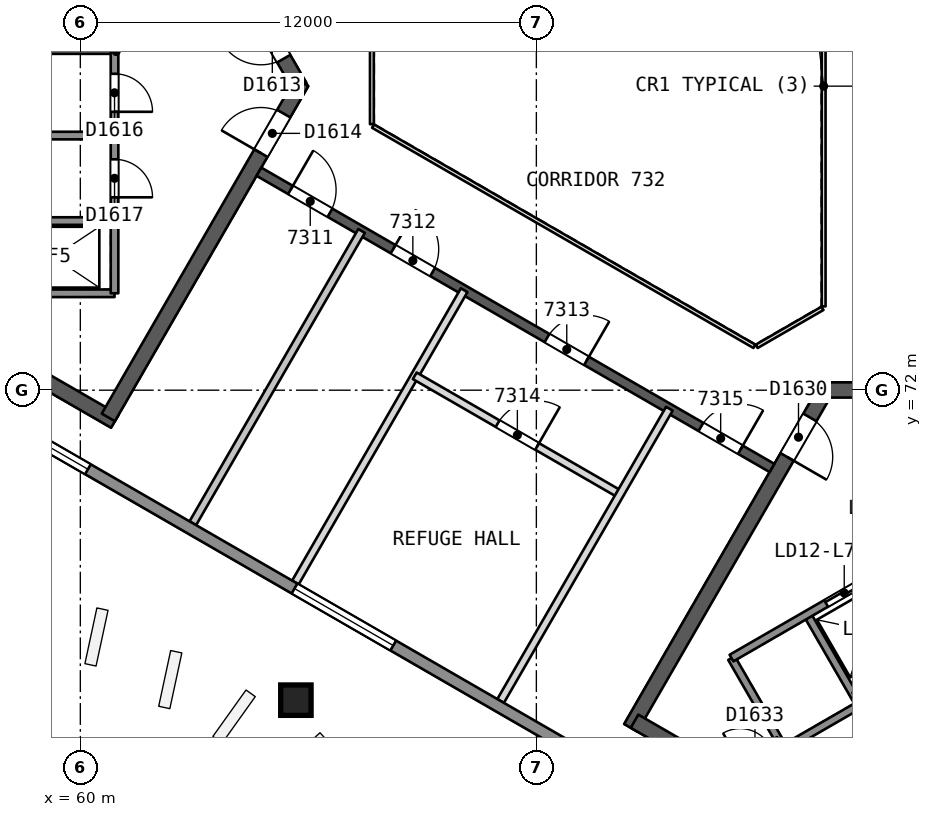
"""IFC4 building model, lengths in metres.
Left out: names, types, materials, properties, quantities, classifications, styles, units other than length and angle.
Written with IfcOpenShell. Run it as: python <this file> out.ifc"""

import sys

from ifc_helpers import new_model, si_unit, direction, frame, frame_2d, origin, origin_2d, place, context, subcontext, project, spatial, rectangle, extrude, element, fill, save


model = new_model("IFC4")
c1 = context("Model", 3, precision=1e-05, world=origin(), true_north=direction((0.0, 1.0)))
c2 = subcontext(c1, "Body", "Model", "MODEL_VIEW")
j1 = project(units=[si_unit("LENGTHUNIT", "METRE"), si_unit("PLANEANGLEUNIT", "RADIAN")], contexts=[c1])
p1 = place(None, origin())
s1 = spatial("IfcSite", under=j1, at=p1, CompositionType="ELEMENT")
p2 = place(p1, origin())
s2 = spatial("IfcBuilding", under=s1, at=p2, CompositionType="ELEMENT")
p3 = place(p2, frame((0.0, 0.0, 296.0)))
s3 = spatial("IfcBuildingStorey", under=s2, at=p3, CompositionType="ELEMENT", Elevation=296.0)
p4 = place(p3, frame((65.769, 80.0, 0.0), z_axis=(0.0, 0.0, 1.0), x_axis=(-0.50000177223, 0.866024380585, 0.0)))
e1 = element("IfcWall", 1, at=p4, inside=s3, PredefinedType="SHEAR", context=c2, shape_type="SweptSolid", body=[
    extrude(rectangle(XDim=10.265, YDim=0.4, at=frame_2d((5.132, 0.0))), origin(), (0.0, 0.0, 1.0), 4.4),
])
p5 = place(p4, frame((0.834, 0.0, 0.0)))
e2 = element("IfcOpeningElement", 2, at=p5, cuts=e1, PredefinedType="OPENING", context=c2, shape_type="SweptSolid", body=[
    extrude(rectangle(XDim=1.2, YDim=2.1, at=frame_2d((0.6, 1.05))), frame((0.0, 0.21, 0.0), z_axis=(0.0, -1.0, 0.0), x_axis=(1.0, 0.0, 0.0)), (0.0, 0.0, 1.0), 0.421),
])
p6 = place(p3, frame((48.597, 78.293, 0.0), z_axis=(0.0, 0.0, 1.0), x_axis=(0.866026024469, -0.499998924941, 0.0)))
e3 = element("IfcWall", 3, at=p6, inside=s3, PredefinedType="SHEAR", context=c2, shape_type="SweptSolid", body=[
    extrude(rectangle(XDim=14.218, YDim=0.4, at=frame_2d((7.109, 0.0))), origin(), (0.0, 0.0, 1.0), 4.4),
])
p7 = place(p3, frame((60.737, 71.284, 0.0), z_axis=(0.0, 0.0, 1.0), x_axis=(0.50000547566, 0.866022242388, 0.0)))
e4 = element("IfcWall", 4, at=p7, inside=s3, PredefinedType="SHEAR", context=c2, shape_type="SweptSolid", body=[
    extrude(rectangle(XDim=10.18, YDim=0.4, at=frame_2d((5.09, 0.0))), origin(), (0.0, 0.0, 1.0), 4.4),
])
p8 = place(p7, frame((8.03, 0.0, 0.0)))
e5 = element("IfcOpeningElement", 5, at=p8, cuts=e4, PredefinedType="OPENING", context=c2, shape_type="SweptSolid", body=[
    extrude(rectangle(XDim=1.2, YDim=2.1, at=frame_2d((0.6, 1.05))), frame((0.0, 0.21, 0.0), z_axis=(0.0, -1.0, 0.0), x_axis=(1.0, 0.0, 0.0)), (0.0, 0.0, 1.0), 0.421),
])
p9 = place(p3, frame((79.615, 72.006, 0.0), z_axis=(0.0, 0.0, 1.0), x_axis=(-0.50000177223, -0.866024380585, 0.0)))
e6 = element("IfcWall", 6, at=p9, inside=s3, PredefinedType="SHEAR", context=c2, shape_type="SweptSolid", body=[
    extrude(rectangle(XDim=10.265, YDim=0.4, at=frame_2d((5.132, 0.0))), origin(), (0.0, 0.0, 1.0), 4.4),
])
p10 = place(p9, frame((0.834, 0.0, 0.0)))
e7 = element("IfcOpeningElement", 7, at=p10, cuts=e6, PredefinedType="OPENING", context=c2, shape_type="SweptSolid", body=[
    extrude(rectangle(XDim=1.2, YDim=2.1, at=frame_2d((0.6, 1.05))), frame((0.0, 0.21, 0.0), z_axis=(0.0, -1.0, 0.0), x_axis=(1.0, 0.0, 0.0)), (0.0, 0.0, 1.0), 0.421),
])
p11 = place(p3, frame((74.583, 63.29, 0.0), z_axis=(0.0, 0.0, 1.0), x_axis=(0.866024494188, -0.500001575463, 0.0)))
e8 = element("IfcWall", 8, at=p11, inside=s3, PredefinedType="SHEAR", context=c2, shape_type="SweptSolid", body=[
    extrude(rectangle(XDim=14.133, YDim=0.4, at=frame_2d((7.067, 0.0))), origin(), (0.0, 0.0, 1.0), 4.4),
])
p12 = place(p3, frame((89.68, 72.006, 0.0), z_axis=(0.0, 0.0, 1.0), x_axis=(-1.0, 0.0, 0.0)))
e9 = element("IfcWall", 9, at=p12, inside=s3, PredefinedType="SHEAR", context=c2, shape_type="SweptSolid", body=[
    extrude(rectangle(XDim=10.18, YDim=0.4, at=frame_2d((5.09, 0.0))), origin(), (0.0, 0.0, 1.0), 4.4),
])
p13 = place(p12, frame((8.03, 0.0, 0.0)))
e10 = element("IfcOpeningElement", 10, at=p13, cuts=e9, PredefinedType="OPENING", context=c2, shape_type="SweptSolid", body=[
    extrude(rectangle(XDim=1.2, YDim=2.1, at=frame_2d((0.6, 1.05))), frame((0.0, 0.21, 0.0), z_axis=(0.0, -1.0, 0.0), x_axis=(1.0, 0.0, 0.0)), (0.0, 0.0, 1.0), 0.421),
])
p14 = place(p3, frame((64.7, 77.748, 0.0), z_axis=(0.0, 0.0, 1.0), x_axis=(0.866026492143, -0.499998114903, 0.0)))
e11 = element("IfcWall", 11, at=p14, inside=s3, PredefinedType="SHEAR", context=c2, shape_type="SweptSolid", body=[
    extrude(rectangle(XDim=15.588, YDim=0.25, at=frame_2d((7.794, 0.0))), origin(), (0.0, 0.0, 1.0), 4.0),
])
p15 = place(p14, frame((0.959, 0.0, 0.0)))
e12 = element("IfcOpeningElement", 12, at=p15, cuts=e11, PredefinedType="OPENING", context=c2, shape_type="SweptSolid", body=[
    extrude(rectangle(XDim=1.2, YDim=2.4, at=frame_2d((0.6, 1.2))), frame((0.0, 0.135, 0.0), z_axis=(0.0, -1.0, 0.0), x_axis=(1.0, 0.0, 0.0)), (0.0, 0.0, 1.0), 0.271),
])
p16 = place(p14, frame((4.076, 0.0, 0.0)))
e13 = element("IfcOpeningElement", 13, at=p16, cuts=e11, PredefinedType="OPENING", context=c2, shape_type="SweptSolid", body=[
    extrude(rectangle(XDim=1.2, YDim=2.4, at=frame_2d((0.6, 1.2))), frame((0.0, 0.135, 0.0), z_axis=(0.0, -1.0, 0.0), x_axis=(1.0, 0.0, 0.0)), (0.0, 0.0, 1.0), 0.271),
])
p17 = place(p14, frame((8.753, 0.0, 0.0)))
e14 = element("IfcOpeningElement", 14, at=p17, cuts=e11, PredefinedType="OPENING", context=c2, shape_type="SweptSolid", body=[
    extrude(rectangle(XDim=1.2, YDim=2.4, at=frame_2d((0.6, 1.2))), frame((0.0, 0.135, 0.0), z_axis=(0.0, -1.0, 0.0), x_axis=(1.0, 0.0, 0.0)), (0.0, 0.0, 1.0), 0.271),
])
p18 = place(p14, frame((13.43, 0.0, 0.0)))
e15 = element("IfcOpeningElement", 15, at=p18, cuts=e11, PredefinedType="OPENING", context=c2, shape_type="SweptSolid", body=[
    extrude(rectangle(XDim=1.2, YDim=2.4, at=frame_2d((0.6, 1.2))), frame((0.0, 0.135, 0.0), z_axis=(0.0, -1.0, 0.0), x_axis=(1.0, 0.0, 0.0)), (0.0, 0.0, 1.0), 0.271),
])
p19 = place(p3, frame((65.66, 63.823, 0.0), z_axis=(0.010096701434, 0.017530536556, 0.999795347513), x_axis=(-0.498996692992, -0.866367726368, 0.020230251895)))
e16 = element("IfcColumn", 16, at=p19, inside=s3, PredefinedType="COLUMN", context=c2, shape_type="SweptSolid", body=[
    extrude(rectangle(XDim=0.8, YDim=0.8, at=origin_2d()), origin(), (0.0, 0.0, 1.0), 4.401),
])
p20 = place(p3, frame((62.96, 68.499, 0.0), z_axis=(0.0, 0.0, 1.0), x_axis=(0.499985810667, 0.866033595845, 0.0)))
e17 = element("IfcWall", 17, at=p20, inside=s3, PredefinedType="PARTITIONING", context=c2, shape_type="SweptSolid", body=[
    extrude(rectangle(XDim=8.881, YDim=0.2, at=frame_2d((4.44, 0.0))), origin(), (0.0, 0.0, 1.0), 4.0),
])
p21 = place(p3, frame((65.66, 66.94, 0.0), z_axis=(0.0, 0.0, 1.0), x_axis=(0.50000642917, 0.866021691869, 0.0)))
e18 = element("IfcWall", 18, at=p21, inside=s3, PredefinedType="PARTITIONING", context=c2, shape_type="SweptSolid", body=[
    extrude(rectangle(XDim=8.881, YDim=0.2, at=frame_2d((4.44, 0.0))), origin(), (0.0, 0.0, 1.0), 4.0),
])
p22 = place(p3, frame((68.8, 72.379, 0.0), z_axis=(0.0, 0.0, 1.0), x_axis=(0.866022576681, -0.500004896655, 0.0)))
e19 = element("IfcWall", 19, at=p22, inside=s3, PredefinedType="PARTITIONING", context=c2, shape_type="SweptSolid", body=[
    extrude(rectangle(XDim=6.235, YDim=0.2, at=frame_2d((3.118, 0.0))), origin(), (0.0, 0.0, 1.0), 4.0),
])
p23 = place(p22, frame((2.518, 0.0, 0.0)))
e20 = element("IfcOpeningElement", 20, at=p23, cuts=e19, PredefinedType="OPENING", context=c2, shape_type="SweptSolid", body=[
    extrude(rectangle(XDim=1.2, YDim=2.4, at=frame_2d((0.6, 1.2))), frame((0.0, 0.11, 0.0), z_axis=(0.0, -1.0, 0.0), x_axis=(1.0, 0.0, 0.0)), (0.0, 0.0, 1.0), 0.221),
])
p24 = place(p3, frame((71.06, 63.822, 0.0), z_axis=(0.0, 0.0, 1.0), x_axis=(0.50000642917, 0.866021691869, 0.0)))
e21 = element("IfcWall", 21, at=p24, inside=s3, PredefinedType="PARTITIONING", context=c2, shape_type="SweptSolid", body=[
    extrude(rectangle(XDim=8.881, YDim=0.2, at=frame_2d((4.44, 0.0))), origin(), (0.0, 0.0, 1.0), 4.0),
])
p25 = place(p3, frame((87.021, 54.435, 0.0), z_axis=(0.0, 0.0, 1.0), x_axis=(-0.86602624246, 0.499998547369, 0.0)))
e22 = element("IfcWall", 22, at=p25, inside=s3, PredefinedType="SOLIDWALL", context=c2, shape_type="SweptSolid", body=[
    extrude(rectangle(XDim=46.386, YDim=0.3, at=frame_2d((23.193, 0.0))), origin(), (0.0, 0.0, 1.0), 4.0),
])
p26 = place(p25, frame((3.139, 0.0, 0.6)))
e23 = element("IfcOpeningElement", 23, at=p26, cuts=e22, PredefinedType="OPENING", context=c2, shape_type="SweptSolid", body=[
    extrude(rectangle(XDim=3.0, YDim=2.4, at=frame_2d((1.5, 1.2))), frame((0.0, 0.161, 0.0), z_axis=(0.0, -1.0, 0.0), x_axis=(1.0, 0.0, 0.0)), (0.0, 0.0, 1.0), 0.321),
])
p27 = place(p25, frame((12.416, 0.0, 0.6)))
e24 = element("IfcOpeningElement", 24, at=p27, cuts=e22, PredefinedType="OPENING", context=c2, shape_type="SweptSolid", body=[
    extrude(rectangle(XDim=3.0, YDim=2.4, at=frame_2d((1.5, 1.2))), frame((0.0, 0.161, 0.0), z_axis=(0.0, -1.0, 0.0), x_axis=(1.0, 0.0, 0.0)), (0.0, 0.0, 1.0), 0.321),
])
p28 = place(p25, frame((21.693, 0.0, 0.6)))
e25 = element("IfcOpeningElement", 25, at=p28, cuts=e22, PredefinedType="OPENING", context=c2, shape_type="SweptSolid", body=[
    extrude(rectangle(XDim=3.0, YDim=2.4, at=frame_2d((1.5, 1.2))), frame((0.0, 0.161, 0.0), z_axis=(0.0, -1.0, 0.0), x_axis=(1.0, 0.0, 0.0)), (0.0, 0.0, 1.0), 0.321),
])
p29 = place(p25, frame((30.97, 0.0, 0.6)))
e26 = element("IfcOpeningElement", 26, at=p29, cuts=e22, PredefinedType="OPENING", context=c2, shape_type="SweptSolid", body=[
    extrude(rectangle(XDim=3.0, YDim=2.4, at=frame_2d((1.5, 1.2))), frame((0.0, 0.161, 0.0), z_axis=(0.0, -1.0, 0.0), x_axis=(1.0, 0.0, 0.0)), (0.0, 0.0, 1.0), 0.321),
])
p30 = place(p25, frame((40.247, 0.0, 0.6)))
e27 = element("IfcOpeningElement", 27, at=p30, cuts=e22, PredefinedType="OPENING", context=c2, shape_type="SweptSolid", body=[
    extrude(rectangle(XDim=3.0, YDim=2.4, at=frame_2d((1.5, 1.2))), frame((0.0, 0.161, 0.0), z_axis=(0.0, -1.0, 0.0), x_axis=(1.0, 0.0, 0.0)), (0.0, 0.0, 1.0), 0.321),
])
for number, where, z_axis, x_axis in (
    (28, (60.9, 80.95, 0.0), (0.0, 0.0, 1.0), (-1.0, 0.0, 0.0)),
    (29, (60.9, 78.7, 0.0), (0.0, 0.0, 1.0), (-1.0, 0.0, 0.0)),
):
    element("IfcWall", number, at=place(p3, frame(where, z_axis=z_axis, x_axis=x_axis)), inside=s3, PredefinedType="SOLIDWALL", context=c2, shape_type="SweptSolid", body=[
        extrude(rectangle(XDim=2.48, YDim=0.2, at=frame_2d((1.24, 0.0))), origin(), (0.0, 0.0, 1.0), 4.0),
    ])
for number, where, z_axis, x_axis in (
    (30, (60.9, 76.45, 0.0), (0.0, 0.0, 1.0), (-1.0, 0.0, 0.0)),
    (31, (60.9, 74.55, 0.0), (0.0, 0.0, 1.0), (-1.0, 0.0, 0.0)),
):
    element("IfcWall", number, at=place(p3, frame(where, z_axis=z_axis, x_axis=x_axis)), inside=s3, PredefinedType="SOLIDWALL", context=c2, shape_type="SweptSolid", body=[
        extrude(rectangle(XDim=3.05, YDim=0.2, at=frame_2d((1.525, 0.0))), origin(), (0.0, 0.0, 1.0), 4.0),
    ])
p31 = place(p3, frame((60.9, 85.45, 0.0), z_axis=(0.0, 0.0, 1.0), x_axis=(0.0, -1.0, 0.0)))
e32 = element("IfcWall", 32, at=p31, inside=s3, PredefinedType="SOLIDWALL", context=c2, shape_type="SweptSolid", body=[
    extrude(rectangle(XDim=10.9, YDim=0.2, at=frame_2d((5.45, 0.0))), origin(), (0.0, 0.0, 1.0), 4.0),
])
p32 = place(p31, frame((1.75, 0.0, 0.0)))
e33 = element("IfcOpeningElement", 33, at=p32, cuts=e32, PredefinedType="OPENING", context=c2, shape_type="SweptSolid", body=[
    extrude(rectangle(XDim=1.0, YDim=2.1, at=frame_2d((0.5, 1.05))), frame((0.0, 0.11, 0.0), z_axis=(0.0, -1.0, 0.0), x_axis=(1.0, 0.0, 0.0)), (0.0, 0.0, 1.0), 0.221),
])
p33 = place(p31, frame((5.125, 0.0, 0.0)))
e34 = element("IfcOpeningElement", 34, at=p33, cuts=e32, PredefinedType="OPENING", context=c2, shape_type="SweptSolid", body=[
    extrude(rectangle(XDim=1.0, YDim=2.1, at=frame_2d((0.5, 1.05))), frame((0.0, 0.11, 0.0), z_axis=(0.0, -1.0, 0.0), x_axis=(1.0, 0.0, 0.0)), (0.0, 0.0, 1.0), 0.221),
])
p34 = place(p31, frame((7.375, 0.0, 0.0)))
e35 = element("IfcOpeningElement", 35, at=p34, cuts=e32, PredefinedType="OPENING", context=c2, shape_type="SweptSolid", body=[
    extrude(rectangle(XDim=1.0, YDim=2.1, at=frame_2d((0.5, 1.05))), frame((0.0, 0.11, 0.0), z_axis=(0.0, -1.0, 0.0), x_axis=(1.0, 0.0, 0.0)), (0.0, 0.0, 1.0), 0.221),
])
for number, where, z_axis, x_axis in (
    (36, (77.135, 64.952, 0.0), (0.0, 0.0, 1.0), (0.5, -0.866, 0.0)),
    (37, (79.127, 66.102, 0.0), (0.0, 0.0, 1.0), (0.5, -0.866, 0.0)),
):
    element("IfcWall", number, at=place(p3, frame(where, z_axis=z_axis, x_axis=x_axis)), inside=s3, PredefinedType="SOLIDWALL", context=c2, shape_type="SweptSolid", body=[
        extrude(rectangle(XDim=2.75, YDim=0.2, at=frame_2d((1.375, 0.0))), origin(), (0.0, 0.0, 1.0), 4.0),
    ])
p35 = place(p3, frame((77.135, 64.952, 0.0), z_axis=(0.0, 0.0, 1.0), x_axis=(0.866031916153, 0.499988720078, 0.0)))
e38 = element("IfcWall", 38, at=p35, inside=s3, PredefinedType="SOLIDWALL", context=c2, shape_type="SweptSolid", body=[
    extrude(rectangle(XDim=11.35, YDim=0.2, at=frame_2d((5.675, 0.0))), origin(), (0.0, 0.0, 1.0), 4.0),
])
p36 = place(p35, frame((2.875, 0.0, 0.0)))
e39 = element("IfcOpeningElement", 39, at=p36, cuts=e38, PredefinedType="OPENING", context=c2, shape_type="SweptSolid", body=[
    extrude(rectangle(XDim=1.1, YDim=2.1, at=frame_2d((0.55, 1.05))), frame((0.0, 0.11, 0.0), z_axis=(0.0, -1.0, 0.0), x_axis=(1.0, 0.0, 0.0)), (0.0, 0.0, 1.0), 0.221),
])
p37 = place(p35, frame((5.125, 0.0, 0.0)))
e40 = element("IfcOpeningElement", 40, at=p37, cuts=e38, PredefinedType="OPENING", context=c2, shape_type="SweptSolid", body=[
    extrude(rectangle(XDim=1.1, YDim=2.1, at=frame_2d((0.55, 1.05))), frame((0.0, 0.11, 0.0), z_axis=(0.0, -1.0, 0.0), x_axis=(1.0, 0.0, 0.0)), (0.0, 0.0, 1.0), 0.221),
])
p38 = place(p35, frame((7.375, 0.0, 0.0)))
e41 = element("IfcOpeningElement", 41, at=p38, cuts=e38, PredefinedType="OPENING", context=c2, shape_type="SweptSolid", body=[
    extrude(rectangle(XDim=1.1, YDim=2.1, at=frame_2d((0.55, 1.05))), frame((0.0, 0.11, 0.0), z_axis=(0.0, -1.0, 0.0), x_axis=(1.0, 0.0, 0.0)), (0.0, 0.0, 1.0), 0.221),
])
p39 = place(p3, frame((80.367, 63.954, 0.0), z_axis=(0.0, 0.0, 1.0), x_axis=(0.866026575979, 0.499997969693, 0.0)))
e42 = element("IfcWall", 42, at=p39, inside=s3, PredefinedType="SOLIDWALL", context=c2, shape_type="SweptSolid", body=[
    extrude(rectangle(XDim=6.75, YDim=0.2, at=frame_2d((3.375, 0.0))), origin(), (0.0, 0.0, 1.0), 4.0),
])
p40 = place(p3, frame((78.51, 62.57, 0.0), z_axis=(0.0, 0.0, 1.0), x_axis=(0.866053019151, 0.499952165731, 0.0)))
e43 = element("IfcWall", 43, at=p40, inside=s3, PredefinedType="SOLIDWALL", context=c2, shape_type="SweptSolid", body=[
    extrude(rectangle(XDim=2.3, YDim=0.2, at=frame_2d((1.15, 0.0))), origin(), (0.0, 0.0, 1.0), 4.0),
])
p41 = place(p3, frame((79.56, 74.206, 0.0), z_axis=(0.0, 0.0, 1.0), x_axis=(0.0, 1.0, 0.0)))
e44 = element("IfcWall", 44, at=p41, inside=s3, PredefinedType="PARTITIONING", context=c2, shape_type="SweptSolid", body=[
    extrude(rectangle(XDim=11.588, YDim=0.1, at=frame_2d((5.794, 0.0))), origin(), (0.0, 0.0, 1.0), 4.0),
])
p42 = place(p3, frame((67.672, 81.0, 0.0), z_axis=(0.0, 0.0, 1.0), x_axis=(0.0, -1.0, 0.0)))
e45 = element("IfcWall", 45, at=p42, inside=s3, PredefinedType="PARTITIONING", context=c2, shape_type="SweptSolid", body=[
    extrude(rectangle(XDim=2.0, YDim=0.1, at=frame_2d((1.0, 0.0))), origin(), (0.0, 0.0, 1.0), 4.0),
])
p43 = place(p3, frame((67.702, 78.948, 0.0), z_axis=(0.0, 0.0, 1.0), x_axis=(0.866026658274, -0.499997827154, 0.0)))
e46 = element("IfcWall", 46, at=p43, inside=s3, PredefinedType="PARTITIONING", context=c2, shape_type="SweptSolid", body=[
    extrude(rectangle(XDim=11.588, YDim=0.1, at=frame_2d((5.794, 0.0))), origin(), (0.0, 0.0, 1.0), 4.0),
])
p44 = place(p3, frame((77.798, 73.154, 0.0), z_axis=(0.0, 0.0, 1.0), x_axis=(0.866041268327, 0.499972520799, 0.0)))
e47 = element("IfcWall", 47, at=p44, inside=s3, PredefinedType="PARTITIONING", context=c2, shape_type="SweptSolid", body=[
    extrude(rectangle(XDim=2.0, YDim=0.1, at=frame_2d((1.0, 0.0))), origin(), (0.0, 0.0, 1.0), 4.0),
])
p45 = place(p15, origin())
e48 = element("IfcDoor", 48, at=p45, inside=s3, OperationType="SINGLE_SWING_LEFT", PredefinedType="NOTDEFINED", context=c2, shape_type="SweptSolid", body=[
    extrude(rectangle(XDim=1.2, YDim=2.4, at=frame_2d((0.6, 1.2))), frame((0.0, 0.025, 0.0), z_axis=(0.0, -1.0, 0.0), x_axis=(1.0, 0.0, 0.0)), (0.0, 0.0, 1.0), 0.05),
])
fill(e12, e48)
p46 = place(p16, origin())
e49 = element("IfcDoor", 49, at=p46, inside=s3, OperationType="SINGLE_SWING_LEFT", PredefinedType="NOTDEFINED", context=c2, shape_type="SweptSolid", body=[
    extrude(rectangle(XDim=1.2, YDim=2.4, at=frame_2d((0.6, 1.2))), frame((0.0, 0.025, 0.0), z_axis=(0.0, -1.0, 0.0), x_axis=(1.0, 0.0, 0.0)), (0.0, 0.0, 1.0), 0.05),
])
fill(e13, e49)
p47 = place(p17, origin())
e50 = element("IfcDoor", 50, at=p47, inside=s3, OperationType="SINGLE_SWING_RIGHT", PredefinedType="NOTDEFINED", context=c2, shape_type="SweptSolid", body=[
    extrude(rectangle(XDim=1.2, YDim=2.4, at=frame_2d((0.6, 1.2))), frame((0.0, 0.025, 0.0), z_axis=(0.0, -1.0, 0.0), x_axis=(1.0, 0.0, 0.0)), (0.0, 0.0, 1.0), 0.05),
])
fill(e14, e50)
p48 = place(p23, origin())
e51 = element("IfcDoor", 51, at=p48, inside=s3, OperationType="SINGLE_SWING_RIGHT", PredefinedType="NOTDEFINED", context=c2, shape_type="SweptSolid", body=[
    extrude(rectangle(XDim=1.2, YDim=2.4, at=frame_2d((0.6, 1.2))), frame((0.0, 0.025, 0.0), z_axis=(0.0, -1.0, 0.0), x_axis=(1.0, 0.0, 0.0)), (0.0, 0.0, 1.0), 0.05),
])
fill(e20, e51)
p49 = place(p18, origin())
e52 = element("IfcDoor", 52, at=p49, inside=s3, OperationType="SINGLE_SWING_RIGHT", PredefinedType="NOTDEFINED", context=c2, shape_type="SweptSolid", body=[
    extrude(rectangle(XDim=1.2, YDim=2.4, at=frame_2d((0.6, 1.2))), frame((0.0, 0.025, 0.0), z_axis=(0.0, -1.0, 0.0), x_axis=(1.0, 0.0, 0.0)), (0.0, 0.0, 1.0), 0.05),
])
fill(e15, e52)
p50 = place(p28, origin())
e53 = element("IfcWindow", 53, at=p50, inside=s3, PartitioningType="SINGLE_PANEL", PredefinedType="WINDOW", context=c2, shape_type="SweptSolid", body=[
    extrude(rectangle(XDim=3.0, YDim=2.4, at=frame_2d((1.5, 1.2))), frame((0.0, 0.03, 0.0), z_axis=(0.0, -1.0, 0.0), x_axis=(1.0, 0.0, 0.0)), (0.0, 0.0, 1.0), 0.06),
])
fill(e25, e53)
p51 = place(p29, origin())
e54 = element("IfcWindow", 54, at=p51, inside=s3, PartitioningType="SINGLE_PANEL", PredefinedType="WINDOW", context=c2, shape_type="SweptSolid", body=[
    extrude(rectangle(XDim=3.0, YDim=2.4, at=frame_2d((1.5, 1.2))), frame((0.0, 0.03, 0.0), z_axis=(0.0, -1.0, 0.0), x_axis=(1.0, 0.0, 0.0)), (0.0, 0.0, 1.0), 0.06),
])
fill(e26, e54)
p52 = place(p5, origin())
e55 = element("IfcDoor", 55, at=p52, inside=s3, OperationType="SINGLE_SWING_RIGHT", PredefinedType="NOTDEFINED", context=c2, shape_type="SweptSolid", body=[
    extrude(rectangle(XDim=1.2, YDim=2.1, at=frame_2d((0.6, 1.05))), frame((0.0, 0.025, 0.0), z_axis=(0.0, -1.0, 0.0), x_axis=(1.0, 0.0, 0.0)), (0.0, 0.0, 1.0), 0.05),
])
fill(e2, e55)
p53 = place(p8, origin())
e56 = element("IfcDoor", 56, at=p53, inside=s3, OperationType="SINGLE_SWING_LEFT", PredefinedType="NOTDEFINED", context=c2, shape_type="SweptSolid", body=[
    extrude(rectangle(XDim=1.2, YDim=2.1, at=frame_2d((0.6, 1.05))), frame((0.0, 0.025, 0.0), z_axis=(0.0, -1.0, 0.0), x_axis=(1.0, 0.0, 0.0)), (0.0, 0.0, 1.0), 0.05),
])
fill(e5, e56)
p54 = place(p33, origin())
e57 = element("IfcDoor", 57, at=p54, inside=s3, OperationType="SINGLE_SWING_RIGHT", PredefinedType="NOTDEFINED", context=c2, shape_type="SweptSolid", body=[
    extrude(rectangle(XDim=1.0, YDim=2.1, at=frame_2d((0.5, 1.05))), frame((0.0, 0.025, 0.0), z_axis=(0.0, -1.0, 0.0), x_axis=(1.0, 0.0, 0.0)), (0.0, 0.0, 1.0), 0.05),
])
fill(e34, e57)
p55 = place(p34, origin())
e58 = element("IfcDoor", 58, at=p55, inside=s3, OperationType="SINGLE_SWING_RIGHT", PredefinedType="NOTDEFINED", context=c2, shape_type="SweptSolid", body=[
    extrude(rectangle(XDim=1.0, YDim=2.1, at=frame_2d((0.5, 1.05))), frame((0.0, 0.025, 0.0), z_axis=(0.0, -1.0, 0.0), x_axis=(1.0, 0.0, 0.0)), (0.0, 0.0, 1.0), 0.05),
])
fill(e35, e58)
p56 = place(p10, origin())
e59 = element("IfcDoor", 59, at=p56, inside=s3, OperationType="SINGLE_SWING_RIGHT", PredefinedType="NOTDEFINED", context=c2, shape_type="SweptSolid", body=[
    extrude(rectangle(XDim=1.2, YDim=2.1, at=frame_2d((0.6, 1.05))), frame((0.0, 0.025, 0.0), z_axis=(0.0, -1.0, 0.0), x_axis=(1.0, 0.0, 0.0)), (0.0, 0.0, 1.0), 0.05),
])
fill(e7, e59)
p57 = place(p36, origin())
e60 = element("IfcDoor", 60, at=p57, inside=s3, OperationType="SLIDING_TO_LEFT", PredefinedType="NOTDEFINED", context=c2, shape_type="SweptSolid", body=[
    extrude(rectangle(XDim=1.1, YDim=2.1, at=frame_2d((0.55, 1.05))), frame((0.0, 0.025, 0.0), z_axis=(0.0, -1.0, 0.0), x_axis=(1.0, 0.0, 0.0)), (0.0, 0.0, 1.0), 0.05),
])
fill(e39, e60)
save(model, sys.argv[1])
